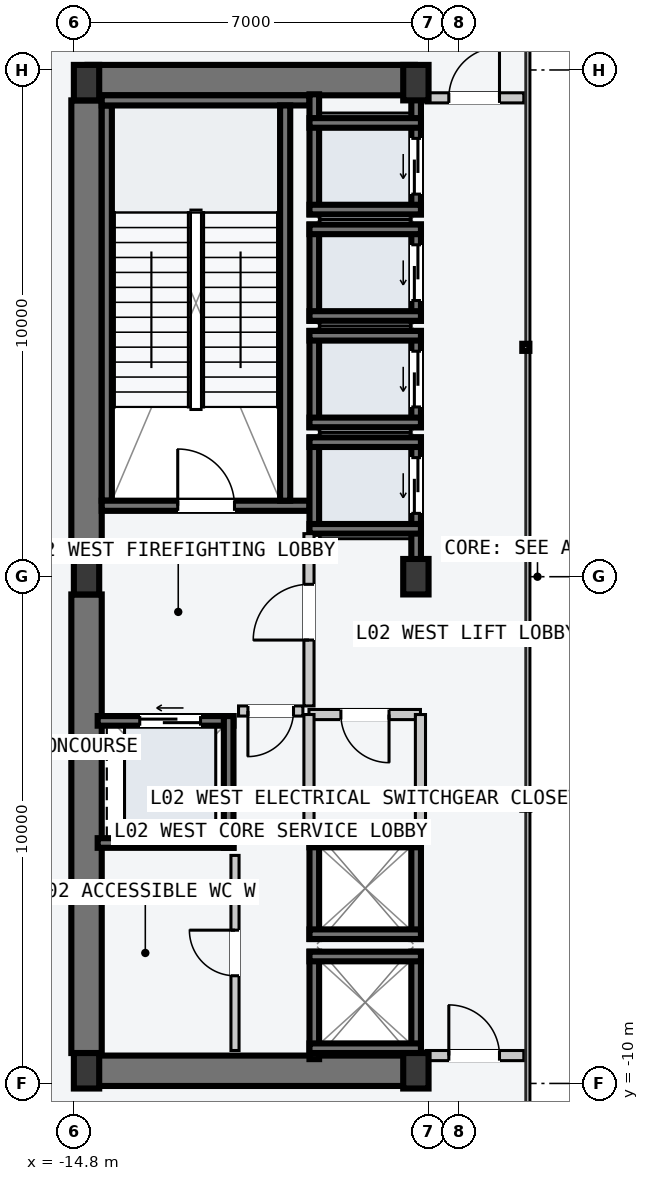
"""IFC4 building model, lengths in metres.
Left out: names, types, materials, properties, quantities, classifications, styles, units other than length and angle.
Written with IfcOpenShell. Run it as: python <this file> out.ifc"""

import sys

from ifc_helpers import new_model, si_unit, direction, frame, frame_2d, origin, origin_2d, place, context, subcontext, project, spatial, rectangle, i_section, extrude, element, fill, save


model = new_model("IFC4")
c1 = context("Model", 3, precision=1e-05, world=origin(), true_north=direction((0.0, 1.0)))
c2 = subcontext(c1, "Body", "Model", "MODEL_VIEW")
j1 = project(units=[si_unit("LENGTHUNIT", "METRE"), si_unit("PLANEANGLEUNIT", "RADIAN")], contexts=[c1])
p1 = place(None, origin())
s1 = spatial("IfcSite", under=j1, at=p1, CompositionType="ELEMENT")
p2 = place(p1, origin())
s2 = spatial("IfcBuilding", under=s1, at=p2, CompositionType="ELEMENT")
p3 = place(p2, frame((0.0, 0.0, 9.6)))
s3 = spatial("IfcBuildingStorey", under=s2, at=p3, CompositionType="ELEMENT", Elevation=9.6)
for number, where, z_axis, x_axis in (
    (1, (-14.53, -9.75, -0.22), (0.0, 0.0, 1.0), (1.0, 0.0, 0.0)),
    (2, (-14.53, 9.8, -0.22), (0.0, 0.0, 1.0), (1.0, 0.0, 0.0)),
):
    element("IfcWall", number, at=place(p3, frame(where, z_axis=z_axis, x_axis=x_axis)), inside=s3, PredefinedType="SHEAR", context=c2, shape_type="SweptSolid", body=[
        extrude(rectangle(XDim=6.46, YDim=0.6, at=frame_2d((3.23, 0.0))), origin(), (0.0, 0.0, 1.0), 4.8),
    ])
for number, where, z_axis, x_axis in (
    (3, (-14.55, -9.4, -0.22), (0.0, 0.0, 1.0), (0.0, 1.0, 0.0)),
    (4, (-14.55, 0.35, -0.22), (0.0, 0.0, 1.0), (0.0, 1.0, 0.0)),
):
    element("IfcWall", number, at=place(p3, frame(where, z_axis=z_axis, x_axis=x_axis)), inside=s3, PredefinedType="SHEAR", context=c2, shape_type="SweptSolid", body=[
        extrude(rectangle(XDim=9.05, YDim=0.6, at=frame_2d((4.525, 0.0))), origin(), (0.0, 0.0, 1.0), 4.8),
    ])
p4 = place(p3, frame((-14.15, 1.5, -0.22), z_axis=(0.0, 0.0, 1.0), x_axis=(0.0, 1.0, 0.0)))
e5 = element("IfcWall", 5, at=p4, inside=s3, PredefinedType="SOLIDWALL", context=c2, shape_type="SweptSolid", body=[
    extrude(rectangle(XDim=7.8, YDim=0.2, at=frame_2d((3.9, 0.0))), origin(), (0.0, 0.0, 1.0), 4.8),
])
p5 = place(p3, frame((-14.25, 1.4, -0.22), z_axis=(0.0, 0.0, 1.0), x_axis=(1.0, 0.0, 0.0)))
e6 = element("IfcWall", 6, at=p5, inside=s3, PredefinedType="SOLIDWALL", context=c2, shape_type="SweptSolid", body=[
    extrude(rectangle(XDim=4.1, YDim=0.2, at=frame_2d((2.05, 0.0))), origin(), (0.0, 0.0, 1.0), 4.8),
])
p6 = place(p5, frame((1.5, 0.0, 0.22)))
e7 = element("IfcOpeningElement", 7, at=p6, cuts=e6, PredefinedType="OPENING", context=c2, shape_type="SweptSolid", body=[
    extrude(rectangle(XDim=1.12, YDim=2.18, at=frame_2d((0.56, 1.09))), frame((0.0, 0.11, 0.0), z_axis=(0.0, -1.0, 0.0), x_axis=(1.0, 0.0, 0.0)), (0.0, 0.0, 1.0), 0.22),
])
p7 = place(p3, frame((-14.25, 9.4, -0.22), z_axis=(0.0, 0.0, 1.0), x_axis=(1.0, 0.0, 0.0)))
e8 = element("IfcWall", 8, at=p7, inside=s3, PredefinedType="SOLIDWALL", context=c2, shape_type="SweptSolid", body=[
    extrude(rectangle(XDim=4.1, YDim=0.2, at=frame_2d((2.05, 0.0))), origin(), (0.0, 0.0, 1.0), 4.8),
])
p8 = place(p3, frame((-10.63, 1.5, -0.22), z_axis=(0.0, 0.0, 1.0), x_axis=(0.0, 1.0, 0.0)))
e9 = element("IfcWall", 9, at=p8, inside=s3, PredefinedType="SOLIDWALL", context=c2, shape_type="SweptSolid", body=[
    extrude(rectangle(XDim=7.8, YDim=0.2, at=frame_2d((3.9, 0.0))), origin(), (0.0, 0.0, 1.0), 4.8),
])
for number, where, z_axis, x_axis in (
    (10, (-14.55, -9.75, 0.0), (0.0, 0.0, 1.0), (1.0, 0.0, 0.0)),
    (11, (-14.55, 0.0, 0.0), (0.0, 0.0, 1.0), (1.0, 0.0, 0.0)),
    (12, (-14.55, 9.75, 0.0), (0.0, 0.0, 1.0), (1.0, 0.0, 0.0)),
    (13, (-8.05, -9.75, 0.0), (0.0, 0.0, 1.0), (1.0, 0.0, 0.0)),
    (14, (-8.05, 0.0, 0.0), (0.0, 0.0, 1.0), (1.0, 0.0, 0.0)),
    (15, (-8.05, 9.75, 0.0), (0.0, 0.0, 1.0), (1.0, 0.0, 0.0)),
):
    element("IfcColumn", number, at=place(p3, frame(where, z_axis=z_axis, x_axis=x_axis)), inside=s3, PredefinedType="COLUMN", context=c2, shape_type="SweptSolid", body=[
        extrude(i_section(OverallWidth=0.5, OverallDepth=0.7, WebThickness=0.028, FlangeThickness=0.045, at=origin_2d()), origin(), (0.0, 0.0, 1.0), 4.8),
    ])
p9 = place(p3, frame((-8.045, 0.21, -0.22), z_axis=(0.0, 0.0, 1.0), x_axis=(0.0, 1.0, 0.0)))
e16 = element("IfcWall", 16, at=p9, inside=s3, PredefinedType="SOLIDWALL", context=c2, shape_type="SweptSolid", body=[
    extrude(rectangle(XDim=2.54, YDim=0.19, at=frame_2d((1.27, 0.0))), origin(), (0.0, 0.0, 1.0), 4.8),
])
p10 = place(p9, frame((1.04, 0.0, 0.22)))
e17 = element("IfcOpeningElement", 17, at=p10, cuts=e16, PredefinedType="OPENING", context=c2, shape_type="SweptSolid", body=[
    extrude(rectangle(XDim=1.1, YDim=2.2, at=frame_2d((0.55, 1.1))), frame((0.0, 0.105, 0.0), z_axis=(0.0, -1.0, 0.0), x_axis=(1.0, 0.0, 0.0)), (0.0, 0.0, 1.0), 0.21),
])
p11 = place(p3, frame((-10.055, 0.85, -0.22), z_axis=(0.0, 0.0, 1.0), x_axis=(0.0, 1.0, 0.0)))
e18 = element("IfcWall", 18, at=p11, inside=s3, PredefinedType="SOLIDWALL", context=c2, shape_type="SweptSolid", body=[
    extrude(rectangle(XDim=1.9, YDim=0.19, at=frame_2d((0.95, 0.0))), origin(), (0.0, 0.0, 1.0), 4.8),
])
for number, where, z_axis, x_axis in (
    (19, (-10.15, 2.655, -0.22), (0.0, 0.0, 1.0), (1.0, 0.0, 0.0)),
    (20, (-10.15, 0.945, -0.22), (0.0, 0.0, 1.0), (1.0, 0.0, 0.0)),
):
    element("IfcWall", number, at=place(p3, frame(where, z_axis=z_axis, x_axis=x_axis)), inside=s3, PredefinedType="SOLIDWALL", context=c2, shape_type="SweptSolid", body=[
        extrude(rectangle(XDim=2.2, YDim=0.19, at=frame_2d((1.1, 0.0))), origin(), (0.0, 0.0, 1.0), 4.8),
    ])
p12 = place(p3, frame((-8.045, 2.95, -0.22), z_axis=(0.0, 0.0, 1.0), x_axis=(0.0, 1.0, 0.0)))
e21 = element("IfcWall", 21, at=p12, inside=s3, PredefinedType="SOLIDWALL", context=c2, shape_type="SweptSolid", body=[
    extrude(rectangle(XDim=1.9, YDim=0.19, at=frame_2d((0.95, 0.0))), origin(), (0.0, 0.0, 1.0), 4.8),
])
p13 = place(p12, frame((0.4, 0.0, 0.22)))
e22 = element("IfcOpeningElement", 22, at=p13, cuts=e21, PredefinedType="OPENING", context=c2, shape_type="SweptSolid", body=[
    extrude(rectangle(XDim=1.1, YDim=2.2, at=frame_2d((0.55, 1.1))), frame((0.0, 0.105, 0.0), z_axis=(0.0, -1.0, 0.0), x_axis=(1.0, 0.0, 0.0)), (0.0, 0.0, 1.0), 0.21),
])
p14 = place(p3, frame((-10.055, 2.95, -0.22), z_axis=(0.0, 0.0, 1.0), x_axis=(0.0, 1.0, 0.0)))
e23 = element("IfcWall", 23, at=p14, inside=s3, PredefinedType="SOLIDWALL", context=c2, shape_type="SweptSolid", body=[
    extrude(rectangle(XDim=1.9, YDim=0.19, at=frame_2d((0.95, 0.0))), origin(), (0.0, 0.0, 1.0), 4.8),
])
for number, where, z_axis, x_axis in (
    (24, (-10.15, 4.755, -0.22), (0.0, 0.0, 1.0), (1.0, 0.0, 0.0)),
    (25, (-10.15, 3.045, -0.22), (0.0, 0.0, 1.0), (1.0, 0.0, 0.0)),
):
    element("IfcWall", number, at=place(p3, frame(where, z_axis=z_axis, x_axis=x_axis)), inside=s3, PredefinedType="SOLIDWALL", context=c2, shape_type="SweptSolid", body=[
        extrude(rectangle(XDim=2.2, YDim=0.19, at=frame_2d((1.1, 0.0))), origin(), (0.0, 0.0, 1.0), 4.8),
    ])
p15 = place(p3, frame((-8.045, 5.05, -0.22), z_axis=(0.0, 0.0, 1.0), x_axis=(0.0, 1.0, 0.0)))
e26 = element("IfcWall", 26, at=p15, inside=s3, PredefinedType="SOLIDWALL", context=c2, shape_type="SweptSolid", body=[
    extrude(rectangle(XDim=1.9, YDim=0.19, at=frame_2d((0.95, 0.0))), origin(), (0.0, 0.0, 1.0), 4.8),
])
p16 = place(p15, frame((0.4, 0.0, 0.22)))
e27 = element("IfcOpeningElement", 27, at=p16, cuts=e26, PredefinedType="OPENING", context=c2, shape_type="SweptSolid", body=[
    extrude(rectangle(XDim=1.1, YDim=2.2, at=frame_2d((0.55, 1.1))), frame((0.0, 0.105, 0.0), z_axis=(0.0, -1.0, 0.0), x_axis=(1.0, 0.0, 0.0)), (0.0, 0.0, 1.0), 0.21),
])
p17 = place(p3, frame((-10.055, 5.05, -0.22), z_axis=(0.0, 0.0, 1.0), x_axis=(0.0, 1.0, 0.0)))
e28 = element("IfcWall", 28, at=p17, inside=s3, PredefinedType="SOLIDWALL", context=c2, shape_type="SweptSolid", body=[
    extrude(rectangle(XDim=1.9, YDim=0.19, at=frame_2d((0.95, 0.0))), origin(), (0.0, 0.0, 1.0), 4.8),
])
for number, where, z_axis, x_axis in (
    (29, (-10.15, 6.855, -0.22), (0.0, 0.0, 1.0), (1.0, 0.0, 0.0)),
    (30, (-10.15, 5.145, -0.22), (0.0, 0.0, 1.0), (1.0, 0.0, 0.0)),
):
    element("IfcWall", number, at=place(p3, frame(where, z_axis=z_axis, x_axis=x_axis)), inside=s3, PredefinedType="SOLIDWALL", context=c2, shape_type="SweptSolid", body=[
        extrude(rectangle(XDim=2.2, YDim=0.19, at=frame_2d((1.1, 0.0))), origin(), (0.0, 0.0, 1.0), 4.8),
    ])
p18 = place(p3, frame((-8.045, 7.15, -0.22), z_axis=(0.0, 0.0, 1.0), x_axis=(0.0, 1.0, 0.0)))
e31 = element("IfcWall", 31, at=p18, inside=s3, PredefinedType="SOLIDWALL", context=c2, shape_type="SweptSolid", body=[
    extrude(rectangle(XDim=2.37, YDim=0.19, at=frame_2d((1.185, 0.0))), origin(), (0.0, 0.0, 1.0), 4.8),
])
p19 = place(p18, frame((0.4, 0.0, 0.22)))
e32 = element("IfcOpeningElement", 32, at=p19, cuts=e31, PredefinedType="OPENING", context=c2, shape_type="SweptSolid", body=[
    extrude(rectangle(XDim=1.1, YDim=2.2, at=frame_2d((0.55, 1.1))), frame((0.0, 0.105, 0.0), z_axis=(0.0, -1.0, 0.0), x_axis=(1.0, 0.0, 0.0)), (0.0, 0.0, 1.0), 0.21),
])
p20 = place(p3, frame((-10.055, 7.15, -0.22), z_axis=(0.0, 0.0, 1.0), x_axis=(0.0, 1.0, 0.0)))
e33 = element("IfcWall", 33, at=p20, inside=s3, PredefinedType="SOLIDWALL", context=c2, shape_type="SweptSolid", body=[
    extrude(rectangle(XDim=2.37, YDim=0.19, at=frame_2d((1.185, 0.0))), origin(), (0.0, 0.0, 1.0), 4.8),
])
for number, where, z_axis, x_axis in (
    (34, (-10.15, 8.955, -0.22), (0.0, 0.0, 1.0), (1.0, 0.0, 0.0)),
    (35, (-10.15, 7.245, -0.22), (0.0, 0.0, 1.0), (1.0, 0.0, 0.0)),
):
    element("IfcWall", number, at=place(p3, frame(where, z_axis=z_axis, x_axis=x_axis)), inside=s3, PredefinedType="SOLIDWALL", context=c2, shape_type="SweptSolid", body=[
        extrude(rectangle(XDim=2.2, YDim=0.19, at=frame_2d((1.1, 0.0))), origin(), (0.0, 0.0, 1.0), 4.8),
    ])
for number, where, z_axis, x_axis in (
    (36, (-8.045, -9.52, -0.22), (0.0, 0.0, 1.0), (0.0, 1.0, 0.0)),
    (37, (-10.055, -9.52, -0.22), (0.0, 0.0, 1.0), (0.0, 1.0, 0.0)),
):
    element("IfcWall", number, at=place(p3, frame(where, z_axis=z_axis, x_axis=x_axis)), inside=s3, PredefinedType="SOLIDWALL", context=c2, shape_type="SweptSolid", body=[
        extrude(rectangle(XDim=2.12, YDim=0.19, at=frame_2d((1.06, 0.0))), origin(), (0.0, 0.0, 1.0), 4.8),
    ])
for number, where, z_axis, x_axis in (
    (38, (-10.15, -7.495, -0.22), (0.0, 0.0, 1.0), (1.0, 0.0, 0.0)),
    (39, (-10.15, -9.305, -0.22), (0.0, 0.0, 1.0), (1.0, 0.0, 0.0)),
):
    element("IfcWall", number, at=place(p3, frame(where, z_axis=z_axis, x_axis=x_axis)), inside=s3, PredefinedType="SOLIDWALL", context=c2, shape_type="SweptSolid", body=[
        extrude(rectangle(XDim=2.2, YDim=0.19, at=frame_2d((1.1, 0.0))), origin(), (0.0, 0.0, 1.0), 4.8),
    ])
for number, where, z_axis, x_axis in (
    (40, (-8.045, -7.15, -0.22), (0.0, 0.0, 1.0), (0.0, 1.0, 0.0)),
    (41, (-10.055, -7.15, -0.22), (0.0, 0.0, 1.0), (0.0, 1.0, 0.0)),
):
    element("IfcWall", number, at=place(p3, frame(where, z_axis=z_axis, x_axis=x_axis)), inside=s3, PredefinedType="SOLIDWALL", context=c2, shape_type="SweptSolid", body=[
        extrude(rectangle(XDim=2.0, YDim=0.19, at=frame_2d((1.0, 0.0))), origin(), (0.0, 0.0, 1.0), 4.8),
    ])
for number, where, z_axis, x_axis in (
    (42, (-10.15, -5.245, -0.22), (0.0, 0.0, 1.0), (1.0, 0.0, 0.0)),
    (43, (-10.15, -7.055, -0.22), (0.0, 0.0, 1.0), (1.0, 0.0, 0.0)),
):
    element("IfcWall", number, at=place(p3, frame(where, z_axis=z_axis, x_axis=x_axis)), inside=s3, PredefinedType="SOLIDWALL", context=c2, shape_type="SweptSolid", body=[
        extrude(rectangle(XDim=2.2, YDim=0.19, at=frame_2d((1.1, 0.0))), origin(), (0.0, 0.0, 1.0), 4.8),
    ])
p21 = place(p3, frame((-14.33, -2.845, -0.22), z_axis=(0.0, 0.0, 1.0), x_axis=(1.0, 0.0, 0.0)))
e44 = element("IfcWall", 44, at=p21, inside=s3, PredefinedType="SOLIDWALL", context=c2, shape_type="SweptSolid", body=[
    extrude(rectangle(XDim=2.68, YDim=0.19, at=frame_2d((1.34, 0.0))), origin(), (0.0, 0.0, 1.0), 4.8),
])
p22 = place(p21, frame((0.83, 0.0, 0.22)))
e45 = element("IfcOpeningElement", 45, at=p22, cuts=e44, PredefinedType="OPENING", context=c2, shape_type="SweptSolid", body=[
    extrude(rectangle(XDim=1.2, YDim=2.2, at=frame_2d((0.6, 1.1))), frame((0.0, 0.105, 0.0), z_axis=(0.0, -1.0, 0.0), x_axis=(1.0, 0.0, 0.0)), (0.0, 0.0, 1.0), 0.21),
])
p23 = place(p3, frame((-14.33, -5.255, -0.22), z_axis=(0.0, 0.0, 1.0), x_axis=(1.0, 0.0, 0.0)))
e46 = element("IfcWall", 46, at=p23, inside=s3, PredefinedType="SOLIDWALL", context=c2, shape_type="SweptSolid", body=[
    extrude(rectangle(XDim=2.68, YDim=0.19, at=frame_2d((1.34, 0.0))), origin(), (0.0, 0.0, 1.0), 4.8),
])
p24 = place(p3, frame((-11.745, -5.35, -0.22), z_axis=(0.0, 0.0, 1.0), x_axis=(0.0, 1.0, 0.0)))
e47 = element("IfcWall", 47, at=p24, inside=s3, PredefinedType="SOLIDWALL", context=c2, shape_type="SweptSolid", body=[
    extrude(rectangle(XDim=2.6, YDim=0.19, at=frame_2d((1.3, 0.0))), origin(), (0.0, 0.0, 1.0), 4.8),
])
p25 = place(p3, frame((-10.16, -2.55, 0.0), z_axis=(0.0, 0.0, 1.0), x_axis=(0.0, 1.0, 0.0)))
e48 = element("IfcWall", 48, at=p25, inside=s3, PredefinedType="PARTITIONING", context=c2, shape_type="SweptSolid", body=[
    extrude(rectangle(XDim=3.4, YDim=0.2, at=frame_2d((1.7, 0.0))), origin(), (0.0, 0.0, 1.0), 4.58),
])
p26 = place(p25, frame((1.3, 0.0, 0.0)))
e49 = element("IfcOpeningElement", 49, at=p26, cuts=e48, PredefinedType="OPENING", context=c2, shape_type="SweptSolid", body=[
    extrude(rectangle(XDim=1.1, YDim=2.15, at=frame_2d((0.55, 1.075))), frame((0.0, 0.11, 0.0), z_axis=(0.0, -1.0, 0.0), x_axis=(1.0, 0.0, 0.0)), (0.0, 0.0, 1.0), 0.22),
])
p27 = place(p3, frame((-10.28, -2.65, 0.0), z_axis=(0.0, 0.0, 1.0), x_axis=(-1.0, 0.0, 0.0)))
e50 = element("IfcWall", 50, at=p27, inside=s3, PredefinedType="PARTITIONING", context=c2, shape_type="SweptSolid", body=[
    extrude(rectangle(XDim=1.27, YDim=0.2, at=frame_2d((0.635, 0.0))), origin(), (0.0, 0.0, 1.0), 4.58),
])
p28 = place(p27, frame((0.185, 0.0, 0.0)))
e51 = element("IfcOpeningElement", 51, at=p28, cuts=e50, PredefinedType="OPENING", context=c2, shape_type="SweptSolid", body=[
    extrude(rectangle(XDim=0.9, YDim=2.15, at=frame_2d((0.45, 1.075))), frame((0.0, 0.11, 0.0), z_axis=(0.0, -1.0, 0.0), x_axis=(1.0, 0.0, 0.0)), (0.0, 0.0, 1.0), 0.22),
])
p29 = place(p3, frame((-7.96, -2.72, 0.0), z_axis=(0.0, 0.0, 1.0), x_axis=(-1.0, 0.0, 0.0)))
e52 = element("IfcWall", 52, at=p29, inside=s3, PredefinedType="PARTITIONING", context=c2, shape_type="SweptSolid", body=[
    extrude(rectangle(XDim=2.2, YDim=0.2, at=frame_2d((1.1, 0.0))), origin(), (0.0, 0.0, 1.0), 4.58),
])
p30 = place(p29, frame((0.62, 0.0, 0.0)))
e53 = element("IfcOpeningElement", 53, at=p30, cuts=e52, PredefinedType="OPENING", context=c2, shape_type="SweptSolid", body=[
    extrude(rectangle(XDim=0.95, YDim=2.1, at=frame_2d((0.475, 1.05))), frame((0.0, 0.11, 0.0), z_axis=(0.0, -1.0, 0.0), x_axis=(1.0, 0.0, 0.0)), (0.0, 0.0, 1.0), 0.22),
])
for number, where, z_axis, x_axis in (
    (54, (-7.96, -5.16, 0.0), (0.0, 0.0, 1.0), (0.0, 1.0, 0.0)),
    (55, (-10.16, -5.16, 0.0), (0.0, 0.0, 1.0), (0.0, 1.0, 0.0)),
):
    element("IfcWall", number, at=place(p3, frame(where, z_axis=z_axis, x_axis=x_axis)), inside=s3, PredefinedType="PARTITIONING", context=c2, shape_type="SweptSolid", body=[
        extrude(rectangle(XDim=2.44, YDim=0.2, at=frame_2d((1.22, 0.0))), origin(), (0.0, 0.0, 1.0), 4.58),
    ])
p31 = place(p3, frame((-11.62, -9.35, 0.0), z_axis=(0.0, 0.0, 1.0), x_axis=(0.0, 1.0, 0.0)))
e56 = element("IfcWall", 56, at=p31, inside=s3, PredefinedType="PARTITIONING", context=c2, shape_type="SweptSolid", body=[
    extrude(rectangle(XDim=3.85, YDim=0.16, at=frame_2d((1.925, 0.0))), origin(), (0.0, 0.0, 1.0), 4.58),
])
p32 = place(p31, frame((1.475, 0.0, 0.0)))
e57 = element("IfcOpeningElement", 57, at=p32, cuts=e56, PredefinedType="OPENING", context=c2, shape_type="SweptSolid", body=[
    extrude(rectangle(XDim=0.9, YDim=2.15, at=frame_2d((0.45, 1.075))), frame((0.0, 0.09, 0.0), z_axis=(0.0, -1.0, 0.0), x_axis=(1.0, 0.0, 0.0)), (0.0, 0.0, 1.0), 0.18),
])
p33 = place(p3, frame((-7.85, -9.45, 0.0), z_axis=(0.0, 0.0, 1.0), x_axis=(1.0, 0.0, 0.0)))
e58 = element("IfcWall", 58, at=p33, inside=s3, PredefinedType="PARTITIONING", context=c2, shape_type="SweptSolid", body=[
    extrude(rectangle(XDim=1.93, YDim=0.2, at=frame_2d((0.965, 0.0))), origin(), (0.0, 0.0, 1.0), 2.63),
])
p34 = place(p33, frame((0.45, 0.0, 0.0)))
e59 = element("IfcOpeningElement", 59, at=p34, cuts=e58, PredefinedType="OPENING", context=c2, shape_type="SweptSolid", body=[
    extrude(rectangle(XDim=1.0, YDim=2.15, at=frame_2d((0.5, 1.075))), frame((0.0, 0.11, 0.0), z_axis=(0.0, -1.0, 0.0), x_axis=(1.0, 0.0, 0.0)), (0.0, 0.0, 1.0), 0.22),
])
p35 = place(p3, frame((-7.85, 9.45, 0.0), z_axis=(0.0, 0.0, 1.0), x_axis=(1.0, 0.0, 0.0)))
e60 = element("IfcWall", 60, at=p35, inside=s3, PredefinedType="PARTITIONING", context=c2, shape_type="SweptSolid", body=[
    extrude(rectangle(XDim=1.93, YDim=0.2, at=frame_2d((0.965, 0.0))), origin(), (0.0, 0.0, 1.0), 2.63),
])
p36 = place(p35, frame((0.45, 0.0, 0.0)))
e61 = element("IfcOpeningElement", 61, at=p36, cuts=e60, PredefinedType="OPENING", context=c2, shape_type="SweptSolid", body=[
    extrude(rectangle(XDim=1.0, YDim=2.15, at=frame_2d((0.5, 1.075))), frame((0.0, 0.11, 0.0), z_axis=(0.0, -1.0, 0.0), x_axis=(1.0, 0.0, 0.0)), (0.0, 0.0, 1.0), 0.22),
])
p37 = place(p6, origin())
e62 = element("IfcDoor", 62, at=p37, inside=s3, OperationType="SINGLE_SWING_LEFT", PredefinedType="DOOR", context=c2, shape_type="SweptSolid", body=[
    extrude(rectangle(XDim=1.12, YDim=2.18, at=frame_2d((0.56, 1.09))), frame((0.0, 0.025, 0.0), z_axis=(0.0, -1.0, 0.0), x_axis=(1.0, 0.0, 0.0)), (0.0, 0.0, 1.0), 0.05),
])
fill(e7, e62)
p38 = place(p10, origin())
e63 = element("IfcDoor", 63, at=p38, inside=s3, OperationType="SLIDING_TO_LEFT", PredefinedType="DOOR", context=c2, shape_type="SweptSolid", body=[
    extrude(rectangle(XDim=1.1, YDim=2.2, at=frame_2d((0.55, 1.1))), frame((0.0, 0.025, 0.0), z_axis=(0.0, -1.0, 0.0), x_axis=(1.0, 0.0, 0.0)), (0.0, 0.0, 1.0), 0.05),
])
fill(e17, e63)
p39 = place(p13, origin())
e64 = element("IfcDoor", 64, at=p39, inside=s3, OperationType="SLIDING_TO_LEFT", PredefinedType="DOOR", context=c2, shape_type="SweptSolid", body=[
    extrude(rectangle(XDim=1.1, YDim=2.2, at=frame_2d((0.55, 1.1))), frame((0.0, 0.025, 0.0), z_axis=(0.0, -1.0, 0.0), x_axis=(1.0, 0.0, 0.0)), (0.0, 0.0, 1.0), 0.05),
])
fill(e22, e64)
p40 = place(p16, origin())
e65 = element("IfcDoor", 65, at=p40, inside=s3, OperationType="SLIDING_TO_LEFT", PredefinedType="DOOR", context=c2, shape_type="SweptSolid", body=[
    extrude(rectangle(XDim=1.1, YDim=2.2, at=frame_2d((0.55, 1.1))), frame((0.0, 0.025, 0.0), z_axis=(0.0, -1.0, 0.0), x_axis=(1.0, 0.0, 0.0)), (0.0, 0.0, 1.0), 0.05),
])
fill(e27, e65)
p41 = place(p19, origin())
e66 = element("IfcDoor", 66, at=p41, inside=s3, OperationType="SLIDING_TO_LEFT", PredefinedType="DOOR", context=c2, shape_type="SweptSolid", body=[
    extrude(rectangle(XDim=1.1, YDim=2.2, at=frame_2d((0.55, 1.1))), frame((0.0, 0.025, 0.0), z_axis=(0.0, -1.0, 0.0), x_axis=(1.0, 0.0, 0.0)), (0.0, 0.0, 1.0), 0.05),
])
fill(e32, e66)
p42 = place(p22, origin())
e67 = element("IfcDoor", 67, at=p42, inside=s3, OperationType="SLIDING_TO_LEFT", PredefinedType="DOOR", context=c2, shape_type="SweptSolid", body=[
    extrude(rectangle(XDim=1.2, YDim=2.2, at=frame_2d((0.6, 1.1))), frame((0.0, 0.025, 0.0), z_axis=(0.0, -1.0, 0.0), x_axis=(1.0, 0.0, 0.0)), (0.0, 0.0, 1.0), 0.05),
])
fill(e45, e67)
p43 = place(p26, origin())
e68 = element("IfcDoor", 68, at=p43, inside=s3, OperationType="SINGLE_SWING_LEFT", PredefinedType="DOOR", context=c2, shape_type="SweptSolid", body=[
    extrude(rectangle(XDim=1.1, YDim=2.15, at=frame_2d((0.55, 1.075))), frame((0.0, 0.025, 0.0), z_axis=(0.0, -1.0, 0.0), x_axis=(1.0, 0.0, 0.0)), (0.0, 0.0, 1.0), 0.05),
])
fill(e49, e68)
p44 = place(p28, origin())
e69 = element("IfcDoor", 69, at=p44, inside=s3, OperationType="SINGLE_SWING_RIGHT", PredefinedType="DOOR", context=c2, shape_type="SweptSolid", body=[
    extrude(rectangle(XDim=0.9, YDim=2.15, at=frame_2d((0.45, 1.075))), frame((0.0, 0.025, 0.0), z_axis=(0.0, -1.0, 0.0), x_axis=(1.0, 0.0, 0.0)), (0.0, 0.0, 1.0), 0.05),
])
fill(e51, e69)
p45 = place(p30, origin())
e70 = element("IfcDoor", 70, at=p45, inside=s3, OperationType="SINGLE_SWING_LEFT", PredefinedType="DOOR", context=c2, shape_type="SweptSolid", body=[
    extrude(rectangle(XDim=0.95, YDim=2.1, at=frame_2d((0.475, 1.05))), frame((0.0, 0.025, 0.0), z_axis=(0.0, -1.0, 0.0), x_axis=(1.0, 0.0, 0.0)), (0.0, 0.0, 1.0), 0.05),
])
fill(e53, e70)
p46 = place(p32, origin())
e71 = element("IfcDoor", 71, at=p46, inside=s3, OperationType="SINGLE_SWING_RIGHT", PredefinedType="DOOR", context=c2, shape_type="SweptSolid", body=[
    extrude(rectangle(XDim=0.9, YDim=2.15, at=frame_2d((0.45, 1.075))), frame((0.0, 0.025, 0.0), z_axis=(0.0, -1.0, 0.0), x_axis=(1.0, 0.0, 0.0)), (0.0, 0.0, 1.0), 0.05),
])
fill(e57, e71)
p47 = place(p34, origin())
e72 = element("IfcDoor", 72, at=p47, inside=s3, OperationType="SINGLE_SWING_LEFT", PredefinedType="DOOR", context=c2, shape_type="SweptSolid", body=[
    extrude(rectangle(XDim=1.0, YDim=2.15, at=frame_2d((0.5, 1.075))), frame((0.0, 0.025, 0.0), z_axis=(0.0, -1.0, 0.0), x_axis=(1.0, 0.0, 0.0)), (0.0, 0.0, 1.0), 0.05),
])
fill(e59, e72)
p48 = place(p36, origin())
e73 = element("IfcDoor", 73, at=p48, inside=s3, OperationType="SINGLE_SWING_RIGHT", PredefinedType="DOOR", context=c2, shape_type="SweptSolid", body=[
    extrude(rectangle(XDim=1.0, YDim=2.15, at=frame_2d((0.5, 1.075))), frame((0.0, 0.025, 0.0), z_axis=(0.0, -1.0, 0.0), x_axis=(1.0, 0.0, 0.0)), (0.0, 0.0, 1.0), 0.05),
])
fill(e61, e73)
save(model, sys.argv[1])
